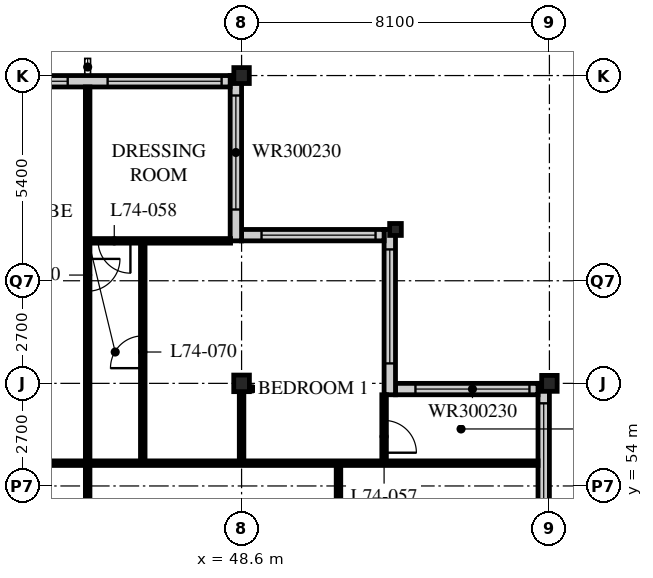
"""IFC4 building model, lengths in metres.
Left out: names, types, materials, properties, quantities, classifications, styles, units other than length and angle.
Written with IfcOpenShell. Run it as: python <this file> out.ifc"""

import sys

from ifc_helpers import new_model, si_unit, direction, frame, frame_2d, origin, origin_2d, place, context, subcontext, project, spatial, rectangle, i_section, extrude, element, fill, save


model = new_model("IFC4")
c1 = context("Model", 3, precision=1e-05, world=origin(), true_north=direction((0.0, 1.0)))
c2 = subcontext(c1, "Body", "Model", "MODEL_VIEW")
j1 = project(units=[si_unit("LENGTHUNIT", "METRE"), si_unit("PLANEANGLEUNIT", "RADIAN")], contexts=[c1])
p1 = place(None, origin())
s1 = spatial("IfcSite", under=j1, at=p1, CompositionType="ELEMENT")
p2 = place(p1, origin())
s2 = spatial("IfcBuilding", under=s1, at=p2, CompositionType="ELEMENT")
p3 = place(p2, frame((0.0, 0.0, 289.2)))
s3 = spatial("IfcBuildingStorey", under=s2, at=p3, CompositionType="ELEMENT", Elevation=289.2)
p4 = place(p3, frame((48.6, 56.7, 0.0), z_axis=(0.0, 0.0, 1.0), x_axis=(1.0, 0.0, 0.0)))
e1 = element("IfcColumn", 1, at=p4, inside=s3, PredefinedType="COLUMN", context=c2, shape_type="SweptSolid", body=[
    extrude(i_section(OverallWidth=0.412, OverallDepth=0.437, WebThickness=0.036, FlangeThickness=0.058, FilletRadius=0.015, at=origin_2d()), origin(), (0.0, 0.0, 1.0), 3.9),
])
p5 = place(p3, frame((48.6, 64.8, 0.0), z_axis=(0.0, 0.0, 1.0), x_axis=(1.0, 0.0, 0.0)))
e2 = element("IfcColumn", 2, at=p5, inside=s3, PredefinedType="COLUMN", context=c2, shape_type="SweptSolid", body=[
    extrude(i_section(OverallWidth=0.407, OverallDepth=0.419, WebThickness=0.031, FlangeThickness=0.049, FilletRadius=0.015, at=origin_2d()), origin(), (0.0, 0.0, 1.0), 3.9),
])
p6 = place(p3, frame((52.65, 60.75, 0.0), z_axis=(0.0, 0.0, 1.0), x_axis=(1.0, 0.0, 0.0)))
e3 = element("IfcColumn", 3, at=p6, inside=s3, PredefinedType="COLUMN", context=c2, shape_type="SweptSolid", body=[
    extrude(i_section(OverallWidth=0.307, OverallDepth=0.314, WebThickness=0.012, FlangeThickness=0.019, FilletRadius=0.015, at=origin_2d()), origin(), (0.0, 0.0, 1.0), 3.9),
])
p7 = place(p3, frame((56.7, 56.7, 0.0), z_axis=(0.0, 0.0, 1.0), x_axis=(1.0, 0.0, 0.0)))
e4 = element("IfcColumn", 4, at=p7, inside=s3, PredefinedType="COLUMN", context=c2, shape_type="SweptSolid", body=[
    extrude(i_section(OverallWidth=0.407, OverallDepth=0.419, WebThickness=0.031, FlangeThickness=0.049, FilletRadius=0.015, at=origin_2d()), origin(), (0.0, 0.0, 1.0), 3.9),
])
p8 = place(p3, frame((56.55, 24.6, 0.0), z_axis=(0.0, 0.0, 1.0), x_axis=(0.0, 1.0, 0.0)))
e5 = element("IfcWall", 5, at=p8, inside=s3, PredefinedType="SOLIDWALL", context=c2, shape_type="SweptSolid", body=[
    extrude(rectangle(XDim=32.1, YDim=0.3, at=frame_2d((16.05, 0.0))), origin(), (0.0, 0.0, 1.0), 3.69),
])
p9 = place(p8, frame((0.225, 0.0, 0.6)))
e6 = element("IfcOpeningElement", 6, at=p9, cuts=e5, PredefinedType="OPENING", context=c2, shape_type="SweptSolid", body=[
    extrude(rectangle(XDim=3.0, YDim=2.4, at=frame_2d((1.5, 1.2))), frame((0.0, 0.16, 0.0), z_axis=(0.0, -1.0, 0.0), x_axis=(1.0, 0.0, 0.0)), (0.0, 0.0, 1.0), 0.32),
])
p10 = place(p8, frame((4.275, 0.0, 0.6)))
e7 = element("IfcOpeningElement", 7, at=p10, cuts=e5, PredefinedType="OPENING", context=c2, shape_type="SweptSolid", body=[
    extrude(rectangle(XDim=3.0, YDim=2.4, at=frame_2d((1.5, 1.2))), frame((0.0, 0.16, 0.0), z_axis=(0.0, -1.0, 0.0), x_axis=(1.0, 0.0, 0.0)), (0.0, 0.0, 1.0), 0.32),
])
p11 = place(p8, frame((8.325, 0.0, 0.6)))
e8 = element("IfcOpeningElement", 8, at=p11, cuts=e5, PredefinedType="OPENING", context=c2, shape_type="SweptSolid", body=[
    extrude(rectangle(XDim=3.0, YDim=2.4, at=frame_2d((1.5, 1.2))), frame((0.0, 0.16, 0.0), z_axis=(0.0, -1.0, 0.0), x_axis=(1.0, 0.0, 0.0)), (0.0, 0.0, 1.0), 0.32),
])
p12 = place(p8, frame((12.375, 0.0, 0.6)))
e9 = element("IfcOpeningElement", 9, at=p12, cuts=e5, PredefinedType="OPENING", context=c2, shape_type="SweptSolid", body=[
    extrude(rectangle(XDim=3.0, YDim=2.4, at=frame_2d((1.5, 1.2))), frame((0.0, 0.16, 0.0), z_axis=(0.0, -1.0, 0.0), x_axis=(1.0, 0.0, 0.0)), (0.0, 0.0, 1.0), 0.32),
])
p13 = place(p8, frame((16.425, 0.0, 0.6)))
e10 = element("IfcOpeningElement", 10, at=p13, cuts=e5, PredefinedType="OPENING", context=c2, shape_type="SweptSolid", body=[
    extrude(rectangle(XDim=3.0, YDim=2.4, at=frame_2d((1.5, 1.2))), frame((0.0, 0.16, 0.0), z_axis=(0.0, -1.0, 0.0), x_axis=(1.0, 0.0, 0.0)), (0.0, 0.0, 1.0), 0.32),
])
p14 = place(p8, frame((20.475, 0.0, 0.6)))
e11 = element("IfcOpeningElement", 11, at=p14, cuts=e5, PredefinedType="OPENING", context=c2, shape_type="SweptSolid", body=[
    extrude(rectangle(XDim=3.0, YDim=2.4, at=frame_2d((1.5, 1.2))), frame((0.0, 0.16, 0.0), z_axis=(0.0, -1.0, 0.0), x_axis=(1.0, 0.0, 0.0)), (0.0, 0.0, 1.0), 0.32),
])
p15 = place(p8, frame((24.525, 0.0, 0.6)))
e12 = element("IfcOpeningElement", 12, at=p15, cuts=e5, PredefinedType="OPENING", context=c2, shape_type="SweptSolid", body=[
    extrude(rectangle(XDim=3.0, YDim=2.4, at=frame_2d((1.5, 1.2))), frame((0.0, 0.16, 0.0), z_axis=(0.0, -1.0, 0.0), x_axis=(1.0, 0.0, 0.0)), (0.0, 0.0, 1.0), 0.32),
])
p16 = place(p8, frame((28.575, 0.0, 0.6)))
e13 = element("IfcOpeningElement", 13, at=p16, cuts=e5, PredefinedType="OPENING", context=c2, shape_type="SweptSolid", body=[
    extrude(rectangle(XDim=3.0, YDim=2.4, at=frame_2d((1.5, 1.2))), frame((0.0, 0.16, 0.0), z_axis=(0.0, -1.0, 0.0), x_axis=(1.0, 0.0, 0.0)), (0.0, 0.0, 1.0), 0.32),
])
p17 = place(p3, frame((56.4, 56.55, 0.0), z_axis=(0.0, 0.0, 1.0), x_axis=(-1.0, 0.0, 0.0)))
e14 = element("IfcWall", 14, at=p17, inside=s3, PredefinedType="SOLIDWALL", context=c2, shape_type="SweptSolid", body=[
    extrude(rectangle(XDim=3.75, YDim=0.3, at=frame_2d((1.875, 0.0))), origin(), (0.0, 0.0, 1.0), 3.69),
])
p18 = place(p17, frame((0.225, 0.0, 0.6)))
e15 = element("IfcOpeningElement", 15, at=p18, cuts=e14, PredefinedType="OPENING", context=c2, shape_type="SweptSolid", body=[
    extrude(rectangle(XDim=3.0, YDim=2.3, at=frame_2d((1.5, 1.15))), frame((0.0, 0.16, 0.0), z_axis=(0.0, -1.0, 0.0), x_axis=(1.0, 0.0, 0.0)), (0.0, 0.0, 1.0), 0.32),
])
p19 = place(p3, frame((52.5, 56.4, 0.0), z_axis=(0.0, 0.0, 1.0), x_axis=(0.0, 1.0, 0.0)))
e16 = element("IfcWall", 16, at=p19, inside=s3, PredefinedType="SOLIDWALL", context=c2, shape_type="SweptSolid", body=[
    extrude(rectangle(XDim=4.35, YDim=0.3, at=frame_2d((2.175, 0.0))), origin(), (0.0, 0.0, 1.0), 3.69),
])
p20 = place(p19, frame((0.825, 0.0, 0.6)))
e17 = element("IfcOpeningElement", 17, at=p20, cuts=e16, PredefinedType="OPENING", context=c2, shape_type="SweptSolid", body=[
    extrude(rectangle(XDim=3.0, YDim=2.3, at=frame_2d((1.5, 1.15))), frame((0.0, 0.16, 0.0), z_axis=(0.0, -1.0, 0.0), x_axis=(1.0, 0.0, 0.0)), (0.0, 0.0, 1.0), 0.32),
])
p21 = place(p3, frame((52.35, 60.6, 0.0), z_axis=(0.0, 0.0, 1.0), x_axis=(-1.0, 0.0, 0.0)))
e18 = element("IfcWall", 18, at=p21, inside=s3, PredefinedType="SOLIDWALL", context=c2, shape_type="SweptSolid", body=[
    extrude(rectangle(XDim=3.75, YDim=0.3, at=frame_2d((1.875, 0.0))), origin(), (0.0, 0.0, 1.0), 3.69),
])
p22 = place(p21, frame((0.225, 0.0, 0.6)))
e19 = element("IfcOpeningElement", 19, at=p22, cuts=e18, PredefinedType="OPENING", context=c2, shape_type="SweptSolid", body=[
    extrude(rectangle(XDim=3.0, YDim=2.3, at=frame_2d((1.5, 1.15))), frame((0.0, 0.16, 0.0), z_axis=(0.0, -1.0, 0.0), x_axis=(1.0, 0.0, 0.0)), (0.0, 0.0, 1.0), 0.32),
])
p23 = place(p3, frame((48.45, 60.45, 0.0), z_axis=(0.0, 0.0, 1.0), x_axis=(0.0, 1.0, 0.0)))
e20 = element("IfcWall", 20, at=p23, inside=s3, PredefinedType="SOLIDWALL", context=c2, shape_type="SweptSolid", body=[
    extrude(rectangle(XDim=4.35, YDim=0.3, at=frame_2d((2.175, 0.0))), origin(), (0.0, 0.0, 1.0), 3.69),
])
p24 = place(p23, frame((0.825, 0.0, 0.6)))
e21 = element("IfcOpeningElement", 21, at=p24, cuts=e20, PredefinedType="OPENING", context=c2, shape_type="SweptSolid", body=[
    extrude(rectangle(XDim=3.0, YDim=2.3, at=frame_2d((1.5, 1.15))), frame((0.0, 0.16, 0.0), z_axis=(0.0, -1.0, 0.0), x_axis=(1.0, 0.0, 0.0)), (0.0, 0.0, 1.0), 0.32),
])
p25 = place(p3, frame((48.3, 64.65, 0.0), z_axis=(0.0, 0.0, 1.0), x_axis=(-1.0, 0.0, 0.0)))
e22 = element("IfcWall", 22, at=p25, inside=s3, PredefinedType="SOLIDWALL", context=c2, shape_type="SweptSolid", body=[
    extrude(rectangle(XDim=40.2, YDim=0.3, at=frame_2d((20.1, 0.0))), origin(), (0.0, 0.0, 1.0), 3.69),
])
p26 = place(p25, frame((0.225, 0.0, 0.6)))
e23 = element("IfcOpeningElement", 23, at=p26, cuts=e22, PredefinedType="OPENING", context=c2, shape_type="SweptSolid", body=[
    extrude(rectangle(XDim=3.0, YDim=2.4, at=frame_2d((1.5, 1.2))), frame((0.0, 0.16, 0.0), z_axis=(0.0, -1.0, 0.0), x_axis=(1.0, 0.0, 0.0)), (0.0, 0.0, 1.0), 0.32),
])
p27 = place(p25, frame((4.275, 0.0, 0.6)))
e24 = element("IfcOpeningElement", 24, at=p27, cuts=e22, PredefinedType="OPENING", context=c2, shape_type="SweptSolid", body=[
    extrude(rectangle(XDim=3.0, YDim=2.4, at=frame_2d((1.5, 1.2))), frame((0.0, 0.16, 0.0), z_axis=(0.0, -1.0, 0.0), x_axis=(1.0, 0.0, 0.0)), (0.0, 0.0, 1.0), 0.32),
])
p28 = place(p25, frame((8.325, 0.0, 0.6)))
e25 = element("IfcOpeningElement", 25, at=p28, cuts=e22, PredefinedType="OPENING", context=c2, shape_type="SweptSolid", body=[
    extrude(rectangle(XDim=3.0, YDim=2.4, at=frame_2d((1.5, 1.2))), frame((0.0, 0.16, 0.0), z_axis=(0.0, -1.0, 0.0), x_axis=(1.0, 0.0, 0.0)), (0.0, 0.0, 1.0), 0.32),
])
p29 = place(p25, frame((12.375, 0.0, 0.6)))
e26 = element("IfcOpeningElement", 26, at=p29, cuts=e22, PredefinedType="OPENING", context=c2, shape_type="SweptSolid", body=[
    extrude(rectangle(XDim=3.0, YDim=2.4, at=frame_2d((1.5, 1.2))), frame((0.0, 0.16, 0.0), z_axis=(0.0, -1.0, 0.0), x_axis=(1.0, 0.0, 0.0)), (0.0, 0.0, 1.0), 0.32),
])
p30 = place(p25, frame((16.425, 0.0, 0.6)))
e27 = element("IfcOpeningElement", 27, at=p30, cuts=e22, PredefinedType="OPENING", context=c2, shape_type="SweptSolid", body=[
    extrude(rectangle(XDim=3.0, YDim=2.4, at=frame_2d((1.5, 1.2))), frame((0.0, 0.16, 0.0), z_axis=(0.0, -1.0, 0.0), x_axis=(1.0, 0.0, 0.0)), (0.0, 0.0, 1.0), 0.32),
])
p31 = place(p25, frame((20.475, 0.0, 0.6)))
e28 = element("IfcOpeningElement", 28, at=p31, cuts=e22, PredefinedType="OPENING", context=c2, shape_type="SweptSolid", body=[
    extrude(rectangle(XDim=3.0, YDim=2.4, at=frame_2d((1.5, 1.2))), frame((0.0, 0.16, 0.0), z_axis=(0.0, -1.0, 0.0), x_axis=(1.0, 0.0, 0.0)), (0.0, 0.0, 1.0), 0.32),
])
p32 = place(p25, frame((24.525, 0.0, 0.6)))
e29 = element("IfcOpeningElement", 29, at=p32, cuts=e22, PredefinedType="OPENING", context=c2, shape_type="SweptSolid", body=[
    extrude(rectangle(XDim=3.0, YDim=2.4, at=frame_2d((1.5, 1.2))), frame((0.0, 0.16, 0.0), z_axis=(0.0, -1.0, 0.0), x_axis=(1.0, 0.0, 0.0)), (0.0, 0.0, 1.0), 0.32),
])
p33 = place(p25, frame((28.575, 0.0, 0.6)))
e30 = element("IfcOpeningElement", 30, at=p33, cuts=e22, PredefinedType="OPENING", context=c2, shape_type="SweptSolid", body=[
    extrude(rectangle(XDim=3.0, YDim=2.4, at=frame_2d((1.5, 1.2))), frame((0.0, 0.16, 0.0), z_axis=(0.0, -1.0, 0.0), x_axis=(1.0, 0.0, 0.0)), (0.0, 0.0, 1.0), 0.32),
])
p34 = place(p25, frame((32.625, 0.0, 0.6)))
e31 = element("IfcOpeningElement", 31, at=p34, cuts=e22, PredefinedType="OPENING", context=c2, shape_type="SweptSolid", body=[
    extrude(rectangle(XDim=3.0, YDim=2.4, at=frame_2d((1.5, 1.2))), frame((0.0, 0.16, 0.0), z_axis=(0.0, -1.0, 0.0), x_axis=(1.0, 0.0, 0.0)), (0.0, 0.0, 1.0), 0.32),
])
p35 = place(p25, frame((36.675, 0.0, 0.6)))
e32 = element("IfcOpeningElement", 32, at=p35, cuts=e22, PredefinedType="OPENING", context=c2, shape_type="SweptSolid", body=[
    extrude(rectangle(XDim=3.0, YDim=2.4, at=frame_2d((1.5, 1.2))), frame((0.0, 0.16, 0.0), z_axis=(0.0, -1.0, 0.0), x_axis=(1.0, 0.0, 0.0)), (0.0, 0.0, 1.0), 0.32),
])
p36 = place(p3, frame((36.45, 54.6, 0.0), z_axis=(0.0, 0.0, 1.0), x_axis=(1.0, 0.0, 0.0)))
e33 = element("IfcWall", 33, at=p36, inside=s3, PredefinedType="PARTITIONING", context=c2, shape_type="SweptSolid", body=[
    extrude(rectangle(XDim=19.95, YDim=0.12, at=frame_2d((9.975, 0.0))), origin(), (0.0, 0.0, 1.0), 3.69),
])
p37 = place(p36, frame((1.675, 0.0, 0.0)))
e34 = element("IfcOpeningElement", 34, at=p37, cuts=e33, PredefinedType="OPENING", context=c2, shape_type="SweptSolid", body=[
    extrude(rectangle(XDim=0.85, YDim=2.1, at=frame_2d((0.425, 1.05))), frame((0.0, 0.07, 0.0), z_axis=(0.0, -1.0, 0.0), x_axis=(1.0, 0.0, 0.0)), (0.0, 0.0, 1.0), 0.14),
])
p38 = place(p3, frame((44.55, 64.5, 0.0), z_axis=(0.0, 0.0, 1.0), x_axis=(0.0, -1.0, 0.0)))
e35 = element("IfcWall", 35, at=p38, inside=s3, PredefinedType="PARTITIONING", context=c2, shape_type="SweptSolid", body=[
    extrude(rectangle(XDim=17.7, YDim=0.12, at=frame_2d((8.85, 0.0))), origin(), (0.0, 0.0, 1.0), 3.69),
])
p39 = place(p38, frame((12.475, 0.0, 0.0)))
e36 = element("IfcOpeningElement", 36, at=p39, cuts=e35, PredefinedType="OPENING", context=c2, shape_type="SweptSolid", body=[
    extrude(rectangle(XDim=0.85, YDim=2.1, at=frame_2d((0.425, 1.05))), frame((0.0, 0.07, 0.0), z_axis=(0.0, -1.0, 0.0), x_axis=(1.0, 0.0, 0.0)), (0.0, 0.0, 1.0), 0.14),
])
p40 = place(p38, frame((4.525, 0.0, 0.0)))
e37 = element("IfcOpeningElement", 37, at=p40, cuts=e35, PredefinedType="OPENING", context=c2, shape_type="SweptSolid", body=[
    extrude(rectangle(XDim=0.85, YDim=2.1, at=frame_2d((0.425, 1.05))), frame((0.0, 0.07, 0.0), z_axis=(0.0, -1.0, 0.0), x_axis=(1.0, 0.0, 0.0)), (0.0, 0.0, 1.0), 0.14),
])
p41 = place(p3, frame((52.35, 54.6, 0.0), z_axis=(0.0, 0.0, 1.0), x_axis=(0.0, 1.0, 0.0)))
e38 = element("IfcWall", 38, at=p41, inside=s3, PredefinedType="PARTITIONING", context=c2, shape_type="SweptSolid", body=[
    extrude(rectangle(XDim=1.8, YDim=0.12, at=frame_2d((0.9, 0.0))), origin(), (0.0, 0.0, 1.0), 3.69),
])
p42 = place(p41, frame((0.275, 0.0, 0.0)))
e39 = element("IfcOpeningElement", 39, at=p42, cuts=e38, PredefinedType="OPENING", context=c2, shape_type="SweptSolid", body=[
    extrude(rectangle(XDim=0.85, YDim=2.1, at=frame_2d((0.425, 1.05))), frame((0.0, 0.07, 0.0), z_axis=(0.0, -1.0, 0.0), x_axis=(1.0, 0.0, 0.0)), (0.0, 0.0, 1.0), 0.14),
])
p43 = place(p3, frame((48.31, 60.45, 0.0), z_axis=(0.0, 0.0, 1.0), x_axis=(-1.0, 0.0, 0.0)))
e40 = element("IfcWall", 40, at=p43, inside=s3, PredefinedType="PARTITIONING", context=c2, shape_type="SweptSolid", body=[
    extrude(rectangle(XDim=3.76, YDim=0.12, at=frame_2d((1.88, 0.0))), origin(), (0.0, 0.0, 1.0), 3.69),
])
p44 = place(p43, frame((2.635, 0.0, 0.0)))
e41 = element("IfcOpeningElement", 41, at=p44, cuts=e40, PredefinedType="OPENING", context=c2, shape_type="SweptSolid", body=[
    extrude(rectangle(XDim=0.85, YDim=2.1, at=frame_2d((0.425, 1.05))), frame((0.0, 0.07, 0.0), z_axis=(0.0, -1.0, 0.0), x_axis=(1.0, 0.0, 0.0)), (0.0, 0.0, 1.0), 0.14),
])
p45 = place(p3, frame((51.15, 46.8, 0.0), z_axis=(0.0, 0.0, 1.0), x_axis=(0.0, 1.0, 0.0)))
e42 = element("IfcWall", 42, at=p45, inside=s3, PredefinedType="PARTITIONING", context=c2, shape_type="SweptSolid", body=[
    extrude(rectangle(XDim=7.8, YDim=0.12, at=frame_2d((3.9, 0.0))), origin(), (0.0, 0.0, 1.0), 3.69),
])
p46 = place(p45, frame((3.475, 0.0, 0.0)))
e43 = element("IfcOpeningElement", 43, at=p46, cuts=e42, PredefinedType="OPENING", context=c2, shape_type="SweptSolid", body=[
    extrude(rectangle(XDim=0.85, YDim=2.1, at=frame_2d((0.425, 1.05))), frame((0.0, 0.07, 0.0), z_axis=(0.0, -1.0, 0.0), x_axis=(1.0, 0.0, 0.0)), (0.0, 0.0, 1.0), 0.14),
])
p47 = place(p3, frame((46.0, 54.6, 0.0), z_axis=(0.0, 0.0, 1.0), x_axis=(0.0, 1.0, 0.0)))
e44 = element("IfcWall", 44, at=p47, inside=s3, PredefinedType="PARTITIONING", context=c2, shape_type="SweptSolid", body=[
    extrude(rectangle(XDim=5.85, YDim=0.12, at=frame_2d((2.925, 0.0))), origin(), (0.0, 0.0, 1.0), 3.69),
])
p48 = place(p47, frame((2.5, 0.0, 0.0)))
e45 = element("IfcOpeningElement", 45, at=p48, cuts=e44, PredefinedType="OPENING", context=c2, shape_type="SweptSolid", body=[
    extrude(rectangle(XDim=0.85, YDim=2.1, at=frame_2d((0.425, 1.05))), frame((0.0, 0.07, 0.0), z_axis=(0.0, -1.0, 0.0), x_axis=(1.0, 0.0, 0.0)), (0.0, 0.0, 1.0), 0.14),
])
p49 = place(p3, frame((48.6, 54.6, 0.0), z_axis=(0.0, 0.0, 1.0), x_axis=(0.0, 1.0, 0.0)))
e46 = element("IfcWall", 46, at=p49, inside=s3, PredefinedType="PARTITIONING", context=c2, shape_type="SweptSolid", body=[
    extrude(rectangle(XDim=1.897, YDim=0.12, at=frame_2d((0.948, 0.0))), origin(), (0.0, 0.0, 1.0), 3.078),
])
p50 = place(p16, origin())
e47 = element("IfcWindow", 47, at=p50, inside=s3, PartitioningType="SINGLE_PANEL", PredefinedType="WINDOW", context=c2, shape_type="SweptSolid", body=[
    extrude(rectangle(XDim=3.0, YDim=2.4, at=frame_2d((1.5, 1.2))), frame((0.0, 0.03, 0.0), z_axis=(0.0, -1.0, 0.0), x_axis=(1.0, 0.0, 0.0)), (0.0, 0.0, 1.0), 0.06),
])
fill(e13, e47)
p51 = place(p18, origin())
e48 = element("IfcWindow", 48, at=p51, inside=s3, PartitioningType="SINGLE_PANEL", PredefinedType="WINDOW", context=c2, shape_type="SweptSolid", body=[
    extrude(rectangle(XDim=3.0, YDim=2.3, at=frame_2d((1.5, 1.15))), frame((0.0, 0.03, 0.0), z_axis=(0.0, -1.0, 0.0), x_axis=(1.0, 0.0, 0.0)), (0.0, 0.0, 1.0), 0.06),
])
fill(e15, e48)
p52 = place(p20, origin())
e49 = element("IfcWindow", 49, at=p52, inside=s3, PartitioningType="SINGLE_PANEL", PredefinedType="WINDOW", context=c2, shape_type="SweptSolid", body=[
    extrude(rectangle(XDim=3.0, YDim=2.3, at=frame_2d((1.5, 1.15))), frame((0.0, 0.03, 0.0), z_axis=(0.0, -1.0, 0.0), x_axis=(1.0, 0.0, 0.0)), (0.0, 0.0, 1.0), 0.06),
])
fill(e17, e49)
p53 = place(p22, origin())
e50 = element("IfcWindow", 50, at=p53, inside=s3, PartitioningType="SINGLE_PANEL", PredefinedType="WINDOW", context=c2, shape_type="SweptSolid", body=[
    extrude(rectangle(XDim=3.0, YDim=2.3, at=frame_2d((1.5, 1.15))), frame((0.0, 0.03, 0.0), z_axis=(0.0, -1.0, 0.0), x_axis=(1.0, 0.0, 0.0)), (0.0, 0.0, 1.0), 0.06),
])
fill(e19, e50)
p54 = place(p24, origin())
e51 = element("IfcWindow", 51, at=p54, inside=s3, PartitioningType="SINGLE_PANEL", PredefinedType="WINDOW", context=c2, shape_type="SweptSolid", body=[
    extrude(rectangle(XDim=3.0, YDim=2.3, at=frame_2d((1.5, 1.15))), frame((0.0, 0.03, 0.0), z_axis=(0.0, -1.0, 0.0), x_axis=(1.0, 0.0, 0.0)), (0.0, 0.0, 1.0), 0.06),
])
fill(e21, e51)
p55 = place(p26, origin())
e52 = element("IfcWindow", 52, at=p55, inside=s3, PartitioningType="SINGLE_PANEL", PredefinedType="WINDOW", context=c2, shape_type="SweptSolid", body=[
    extrude(rectangle(XDim=3.0, YDim=2.4, at=frame_2d((1.5, 1.2))), frame((0.0, 0.03, 0.0), z_axis=(0.0, -1.0, 0.0), x_axis=(1.0, 0.0, 0.0)), (0.0, 0.0, 1.0), 0.06),
])
fill(e23, e52)
p56 = place(p27, origin())
e53 = element("IfcWindow", 53, at=p56, inside=s3, PartitioningType="SINGLE_PANEL", PredefinedType="WINDOW", context=c2, shape_type="SweptSolid", body=[
    extrude(rectangle(XDim=3.0, YDim=2.4, at=frame_2d((1.5, 1.2))), frame((0.0, 0.03, 0.0), z_axis=(0.0, -1.0, 0.0), x_axis=(1.0, 0.0, 0.0)), (0.0, 0.0, 1.0), 0.06),
])
fill(e24, e53)
p57 = place(p40, origin())
e54 = element("IfcDoor", 54, at=p57, inside=s3, OperationType="SINGLE_SWING_LEFT", PredefinedType="DOOR", context=c2, shape_type="SweptSolid", body=[
    extrude(rectangle(XDim=0.85, YDim=2.1, at=frame_2d((0.425, 1.05))), frame((0.0, 0.025, 0.0), z_axis=(0.0, -1.0, 0.0), x_axis=(1.0, 0.0, 0.0)), (0.0, 0.0, 1.0), 0.05),
])
fill(e37, e54)
p58 = place(p42, origin())
e55 = element("IfcDoor", 55, at=p58, inside=s3, OperationType="SINGLE_SWING_RIGHT", PredefinedType="DOOR", context=c2, shape_type="SweptSolid", body=[
    extrude(rectangle(XDim=0.85, YDim=2.1, at=frame_2d((0.425, 1.05))), frame((0.0, 0.025, 0.0), z_axis=(0.0, -1.0, 0.0), x_axis=(1.0, 0.0, 0.0)), (0.0, 0.0, 1.0), 0.05),
])
fill(e39, e55)
p59 = place(p44, origin())
e56 = element("IfcDoor", 56, at=p59, inside=s3, OperationType="SINGLE_SWING_LEFT", PredefinedType="DOOR", context=c2, shape_type="SweptSolid", body=[
    extrude(rectangle(XDim=0.85, YDim=2.1, at=frame_2d((0.425, 1.05))), frame((0.0, 0.025, 0.0), z_axis=(0.0, -1.0, 0.0), x_axis=(1.0, 0.0, 0.0)), (0.0, 0.0, 1.0), 0.05),
])
fill(e41, e56)
p60 = place(p48, origin())
e57 = element("IfcDoor", 57, at=p60, inside=s3, OperationType="SINGLE_SWING_LEFT", PredefinedType="DOOR", context=c2, shape_type="SweptSolid", body=[
    extrude(rectangle(XDim=0.85, YDim=2.1, at=frame_2d((0.425, 1.05))), frame((0.0, 0.025, 0.0), z_axis=(0.0, -1.0, 0.0), x_axis=(1.0, 0.0, 0.0)), (0.0, 0.0, 1.0), 0.05),
])
fill(e45, e57)
save(model, sys.argv[1])
